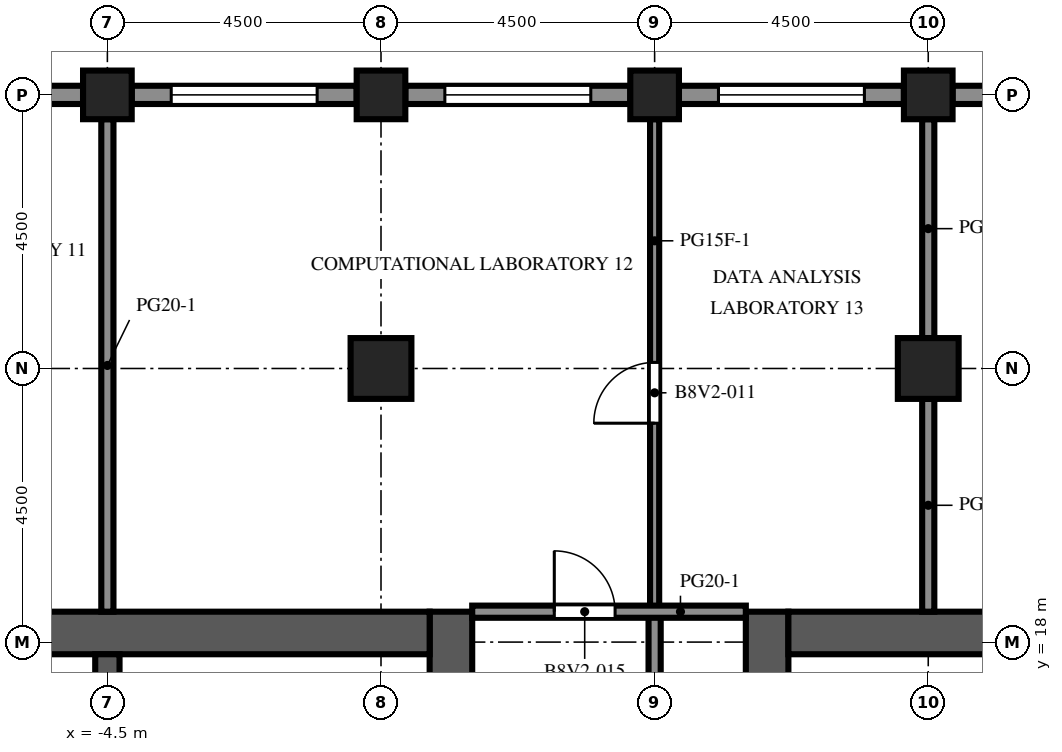
"""IFC4 building model, lengths in metres.
Left out: names, types, materials, properties, quantities, classifications, styles, units other than length and angle.
Written with IfcOpenShell. Run it as: python <this file> out.ifc"""

import sys

from ifc_helpers import new_model, si_unit, direction, frame, frame_2d, origin, origin_2d, place, context, subcontext, project, spatial, rectangle, extrude, element, fill, save


model = new_model("IFC4")
c1 = context("Model", 3, precision=1e-05, world=origin(), true_north=direction((0.0, 1.0)))
c2 = subcontext(c1, "Body", "Model", "MODEL_VIEW")
j1 = project(units=[si_unit("LENGTHUNIT", "METRE"), si_unit("PLANEANGLEUNIT", "RADIAN")], contexts=[c1])
p1 = place(None, origin())
s1 = spatial("IfcSite", under=j1, at=p1, CompositionType="ELEMENT")
p2 = place(p1, origin())
s2 = spatial("IfcBuilding", under=s1, at=p2, CompositionType="ELEMENT")
p3 = place(p2, frame((0.0, 0.0, 282.7)))
s3 = spatial("IfcBuildingStorey", under=s2, at=p3, CompositionType="ELEMENT", Elevation=282.7)
for number, where, z_axis, x_axis in (
    (1, (-4.5, 27.0, 0.0), (0.0, 0.0, 1.0), (1.0, 0.0, 0.0)),
    (2, (0.0, 27.0, 0.0), (0.0, 0.0, 1.0), (1.0, 0.0, 0.0)),
    (3, (4.5, 27.0, 0.0), (0.0, 0.0, 1.0), (1.0, 0.0, 0.0)),
    (4, (9.0, 27.0, 0.0), (0.0, 0.0, 1.0), (1.0, 0.0, 0.0)),
):
    element("IfcColumn", number, at=place(p3, frame(where, z_axis=z_axis, x_axis=x_axis)), inside=s3, PredefinedType="COLUMN", context=c2, shape_type="SweptSolid", body=[
        extrude(rectangle(XDim=0.8, YDim=0.8, at=origin_2d()), origin(), (0.0, 0.0, 1.0), 4.1),
    ])
for number, where, z_axis, x_axis in (
    (5, (0.0, 22.5, 0.0), (0.0, 0.0, 1.0), (1.0, 0.0, 0.0)),
    (6, (9.0, 22.5, 0.0), (0.0, 0.0, 1.0), (1.0, 0.0, 0.0)),
):
    element("IfcColumn", number, at=place(p3, frame(where, z_axis=z_axis, x_axis=x_axis)), inside=s3, PredefinedType="COLUMN", context=c2, shape_type="SweptSolid", body=[
        extrude(rectangle(XDim=1.0, YDim=1.0, at=origin_2d()), origin(), (0.0, 0.0, 1.0), 4.1),
    ])
p4 = place(p3, frame((1.15, -9.0, 0.0), z_axis=(0.0, 0.0, 1.0), x_axis=(0.0, 1.0, 0.0)))
e7 = element("IfcWall", 7, at=p4, inside=s3, PredefinedType="SHEAR", context=c2, shape_type="SweptSolid", body=[
    extrude(rectangle(XDim=27.5, YDim=0.7, at=frame_2d((13.75, 0.0))), origin(), (0.0, 0.0, 1.0), 4.1),
])
p5 = place(p4, frame((12.55, 0.0, 0.0)))
e8 = element("IfcOpeningElement", 8, at=p5, cuts=e7, PredefinedType="OPENING", context=c2, shape_type="SweptSolid", body=[
    extrude(rectangle(XDim=2.4, YDim=2.4, at=frame_2d((1.2, 1.2))), frame((0.0, 0.36, 0.0), z_axis=(0.0, -1.0, 0.0), x_axis=(1.0, 0.0, 0.0)), (0.0, 0.0, 1.0), 0.72),
])
p6 = place(p4, frame((3.9, 0.0, 0.0)))
e9 = element("IfcOpeningElement", 9, at=p6, cuts=e7, PredefinedType="OPENING", context=c2, shape_type="SweptSolid", body=[
    extrude(rectangle(XDim=1.2, YDim=2.1, at=frame_2d((0.6, 1.05))), frame((0.0, 0.36, 0.0), z_axis=(0.0, -1.0, 0.0), x_axis=(1.0, 0.0, 0.0)), (0.0, 0.0, 1.0), 0.72),
])
p7 = place(p4, frame((22.4, 0.0, 0.0)))
e10 = element("IfcOpeningElement", 10, at=p7, cuts=e7, PredefinedType="OPENING", context=c2, shape_type="SweptSolid", body=[
    extrude(rectangle(XDim=1.2, YDim=2.1, at=frame_2d((0.6, 1.05))), frame((0.0, 0.36, 0.0), z_axis=(0.0, -1.0, 0.0), x_axis=(1.0, 0.0, 0.0)), (0.0, 0.0, 1.0), 0.72),
])
p8 = place(p3, frame((-9.8, 18.15, 0.0), z_axis=(0.0, 0.0, 1.0), x_axis=(1.0, 0.0, 0.0)))
e11 = element("IfcWall", 11, at=p8, inside=s3, PredefinedType="SHEAR", context=c2, shape_type="SweptSolid", body=[
    extrude(rectangle(XDim=10.6, YDim=0.7, at=frame_2d((5.3, 0.0))), origin(), (0.0, 0.0, 1.0), 4.1),
])
p9 = place(p3, frame((-4.5, 10.2, 0.0), z_axis=(0.0, 0.0, 1.0), x_axis=(0.0, 1.0, 0.0)))
e12 = element("IfcWall", 12, at=p9, inside=s3, PredefinedType="SHEAR", context=c2, shape_type="SweptSolid", body=[
    extrude(rectangle(XDim=7.6, YDim=0.4, at=frame_2d((3.8, 0.0))), origin(), (0.0, 0.0, 1.0), 4.1),
])
p10 = place(p3, frame((6.35, -9.0, 0.0), z_axis=(0.0, 0.0, 1.0), x_axis=(0.0, 1.0, 0.0)))
e13 = element("IfcWall", 13, at=p10, inside=s3, PredefinedType="SHEAR", context=c2, shape_type="SweptSolid", body=[
    extrude(rectangle(XDim=27.5, YDim=0.7, at=frame_2d((13.75, 0.0))), origin(), (0.0, 0.0, 1.0), 4.1),
])
p11 = place(p10, frame((12.55, 0.0, 0.0)))
e14 = element("IfcOpeningElement", 14, at=p11, cuts=e13, PredefinedType="OPENING", context=c2, shape_type="SweptSolid", body=[
    extrude(rectangle(XDim=2.4, YDim=2.4, at=frame_2d((1.2, 1.2))), frame((0.0, 0.36, 0.0), z_axis=(0.0, -1.0, 0.0), x_axis=(1.0, 0.0, 0.0)), (0.0, 0.0, 1.0), 0.72),
])
p12 = place(p10, frame((3.9, 0.0, 0.0)))
e15 = element("IfcOpeningElement", 15, at=p12, cuts=e13, PredefinedType="OPENING", context=c2, shape_type="SweptSolid", body=[
    extrude(rectangle(XDim=1.2, YDim=2.1, at=frame_2d((0.6, 1.05))), frame((0.0, 0.36, 0.0), z_axis=(0.0, -1.0, 0.0), x_axis=(1.0, 0.0, 0.0)), (0.0, 0.0, 1.0), 0.72),
])
p13 = place(p10, frame((22.4, 0.0, 0.0)))
e16 = element("IfcOpeningElement", 16, at=p13, cuts=e13, PredefinedType="OPENING", context=c2, shape_type="SweptSolid", body=[
    extrude(rectangle(XDim=1.2, YDim=2.1, at=frame_2d((0.6, 1.05))), frame((0.0, 0.36, 0.0), z_axis=(0.0, -1.0, 0.0), x_axis=(1.0, 0.0, 0.0)), (0.0, 0.0, 1.0), 0.72),
])
p14 = place(p3, frame((6.7, 18.15, 0.0), z_axis=(0.0, 0.0, 1.0), x_axis=(1.0, 0.0, 0.0)))
e17 = element("IfcWall", 17, at=p14, inside=s3, PredefinedType="SHEAR", context=c2, shape_type="SweptSolid", body=[
    extrude(rectangle(XDim=10.6, YDim=0.7, at=frame_2d((5.3, 0.0))), origin(), (0.0, 0.0, 1.0), 4.1),
])
p15 = place(p3, frame((9.4, 27.0, 0.0), z_axis=(0.0, 0.0, 1.0), x_axis=(1.0, 0.0, 0.0)))
e18 = element("IfcWall", 18, at=p15, inside=s3, PredefinedType="SOLIDWALL", context=c2, shape_type="SweptSolid", body=[
    extrude(rectangle(XDim=3.7, YDim=0.3, at=frame_2d((1.85, 0.0))), origin(), (0.0, 0.0, 1.0), 2.85),
])
p16 = place(p15, frame((1.35, 0.0, 0.0)))
e19 = element("IfcOpeningElement", 19, at=p16, cuts=e18, PredefinedType="OPENING", context=c2, shape_type="SweptSolid", body=[
    extrude(rectangle(XDim=1.0, YDim=2.2, at=frame_2d((0.5, 1.1))), frame((0.0, 0.16, 0.0), z_axis=(0.0, -1.0, 0.0), x_axis=(1.0, 0.0, 0.0)), (0.0, 0.0, 1.0), 0.32),
])
p17 = place(p3, frame((4.9, 27.0, 0.0), z_axis=(0.0, 0.0, 1.0), x_axis=(1.0, 0.0, 0.0)))
e20 = element("IfcWall", 20, at=p17, inside=s3, PredefinedType="SOLIDWALL", context=c2, shape_type="SweptSolid", body=[
    extrude(rectangle(XDim=3.7, YDim=0.3, at=frame_2d((1.85, 0.0))), origin(), (0.0, 0.0, 1.0), 2.85),
])
p18 = place(p17, frame((0.65, 0.0, 0.8)))
e21 = element("IfcOpeningElement", 21, at=p18, cuts=e20, PredefinedType="OPENING", context=c2, shape_type="SweptSolid", body=[
    extrude(rectangle(XDim=2.4, YDim=1.7, at=frame_2d((1.2, 0.85))), frame((0.0, 0.16, 0.0), z_axis=(0.0, -1.0, 0.0), x_axis=(1.0, 0.0, 0.0)), (0.0, 0.0, 1.0), 0.32),
])
p19 = place(p3, frame((0.4, 27.0, 0.0), z_axis=(0.0, 0.0, 1.0), x_axis=(1.0, 0.0, 0.0)))
e22 = element("IfcWall", 22, at=p19, inside=s3, PredefinedType="SOLIDWALL", context=c2, shape_type="SweptSolid", body=[
    extrude(rectangle(XDim=3.7, YDim=0.3, at=frame_2d((1.85, 0.0))), origin(), (0.0, 0.0, 1.0), 2.85),
])
p20 = place(p19, frame((0.65, 0.0, 0.8)))
e23 = element("IfcOpeningElement", 23, at=p20, cuts=e22, PredefinedType="OPENING", context=c2, shape_type="SweptSolid", body=[
    extrude(rectangle(XDim=2.4, YDim=1.7, at=frame_2d((1.2, 0.85))), frame((0.0, 0.16, 0.0), z_axis=(0.0, -1.0, 0.0), x_axis=(1.0, 0.0, 0.0)), (0.0, 0.0, 1.0), 0.32),
])
p21 = place(p3, frame((-4.1, 27.0, 0.0), z_axis=(0.0, 0.0, 1.0), x_axis=(1.0, 0.0, 0.0)))
e24 = element("IfcWall", 24, at=p21, inside=s3, PredefinedType="SOLIDWALL", context=c2, shape_type="SweptSolid", body=[
    extrude(rectangle(XDim=3.7, YDim=0.3, at=frame_2d((1.85, 0.0))), origin(), (0.0, 0.0, 1.0), 2.85),
])
p22 = place(p21, frame((0.65, 0.0, 0.8)))
e25 = element("IfcOpeningElement", 25, at=p22, cuts=e24, PredefinedType="OPENING", context=c2, shape_type="SweptSolid", body=[
    extrude(rectangle(XDim=2.4, YDim=1.7, at=frame_2d((1.2, 0.85))), frame((0.0, 0.16, 0.0), z_axis=(0.0, -1.0, 0.0), x_axis=(1.0, 0.0, 0.0)), (0.0, 0.0, 1.0), 0.32),
])
p23 = place(p3, frame((-8.6, 27.0, 0.0), z_axis=(0.0, 0.0, 1.0), x_axis=(1.0, 0.0, 0.0)))
e26 = element("IfcWall", 26, at=p23, inside=s3, PredefinedType="SOLIDWALL", context=c2, shape_type="SweptSolid", body=[
    extrude(rectangle(XDim=3.7, YDim=0.3, at=frame_2d((1.85, 0.0))), origin(), (0.0, 0.0, 1.0), 2.85),
])
p24 = place(p23, frame((0.65, 0.0, 0.8)))
e27 = element("IfcOpeningElement", 27, at=p24, cuts=e26, PredefinedType="OPENING", context=c2, shape_type="SweptSolid", body=[
    extrude(rectangle(XDim=2.4, YDim=1.7, at=frame_2d((1.2, 0.85))), frame((0.0, 0.16, 0.0), z_axis=(0.0, -1.0, 0.0), x_axis=(1.0, 0.0, 0.0)), (0.0, 0.0, 1.0), 0.32),
])
p25 = place(p3, frame((-0.6, 14.912, 0.0), z_axis=(0.0, 0.0, 1.0), x_axis=(0.0, 1.0, 0.0)))
e28 = element("IfcWall", 28, at=p25, inside=s3, PredefinedType="PARTITIONING", context=c2, shape_type="SweptSolid", body=[
    extrude(rectangle(XDim=2.888, YDim=0.1, at=frame_2d((1.444, 0.0))), origin(), (0.0, 0.0, 1.0), 3.65),
])
p26 = place(p25, frame((0.944, 0.0, 0.0)))
e29 = element("IfcOpeningElement", 29, at=p26, cuts=e28, PredefinedType="OPENING", context=c2, shape_type="SweptSolid", body=[
    extrude(rectangle(XDim=1.0, YDim=2.1, at=frame_2d((0.5, 1.05))), frame((0.0, 0.06, 0.0), z_axis=(0.0, -1.0, 0.0), x_axis=(1.0, 0.0, 0.0)), (0.0, 0.0, 1.0), 0.12),
])
p27 = place(p3, frame((8.1, 14.912, 0.0), z_axis=(0.0, 0.0, 1.0), x_axis=(0.0, 1.0, 0.0)))
e30 = element("IfcWall", 30, at=p27, inside=s3, PredefinedType="PARTITIONING", context=c2, shape_type="SweptSolid", body=[
    extrude(rectangle(XDim=2.888, YDim=0.1, at=frame_2d((1.444, 0.0))), origin(), (0.0, 0.0, 1.0), 3.65),
])
p28 = place(p27, frame((0.944, 0.0, 0.0)))
e31 = element("IfcOpeningElement", 31, at=p28, cuts=e30, PredefinedType="OPENING", context=c2, shape_type="SweptSolid", body=[
    extrude(rectangle(XDim=1.0, YDim=2.1, at=frame_2d((0.5, 1.05))), frame((0.0, 0.06, 0.0), z_axis=(0.0, -1.0, 0.0), x_axis=(1.0, 0.0, 0.0)), (0.0, 0.0, 1.0), 0.12),
])
p29 = place(p3, frame((-4.5, 18.5, 0.0), z_axis=(0.0, 0.0, 1.0), x_axis=(0.0, 1.0, 0.0)))
e32 = element("IfcWall", 32, at=p29, inside=s3, PredefinedType="PARTITIONING", context=c2, shape_type="SweptSolid", body=[
    extrude(rectangle(XDim=8.1, YDim=0.2, at=frame_2d((4.05, 0.0))), origin(), (0.0, 0.0, 1.0), 3.65),
])
p30 = place(p3, frame((4.5, 26.6, 0.0), z_axis=(0.0, 0.0, 1.0), x_axis=(0.0, -1.0, 0.0)))
e33 = element("IfcWall", 33, at=p30, inside=s3, PredefinedType="PARTITIONING", context=c2, shape_type="SweptSolid", body=[
    extrude(rectangle(XDim=8.1, YDim=0.15, at=frame_2d((4.05, 0.0))), origin(), (0.0, 0.0, 1.0), 3.65),
])
p31 = place(p30, frame((4.0, 0.0, 0.0)))
e34 = element("IfcOpeningElement", 34, at=p31, cuts=e33, PredefinedType="OPENING", context=c2, shape_type="SweptSolid", body=[
    extrude(rectangle(XDim=1.0, YDim=2.1, at=frame_2d((0.5, 1.05))), frame((0.0, 0.085, 0.0), z_axis=(0.0, -1.0, 0.0), x_axis=(1.0, 0.0, 0.0)), (0.0, 0.0, 1.0), 0.17),
])
p32 = place(p3, frame((4.5, 18.5, 0.0), z_axis=(0.0, 0.0, 1.0), x_axis=(0.0, -1.0, 0.0)))
e35 = element("IfcWall", 35, at=p32, inside=s3, PredefinedType="PARTITIONING", context=c2, shape_type="SweptSolid", body=[
    extrude(rectangle(XDim=11.8, YDim=0.2, at=frame_2d((5.9, 0.0))), origin(), (0.0, 0.0, 1.0), 3.65),
])
p33 = place(p32, frame((5.2, 0.0, 0.0)))
e36 = element("IfcOpeningElement", 36, at=p33, cuts=e35, PredefinedType="OPENING", context=c2, shape_type="SweptSolid", body=[
    extrude(rectangle(XDim=1.0, YDim=2.1, at=frame_2d((0.5, 1.05))), frame((0.0, 0.11, 0.0), z_axis=(0.0, -1.0, 0.0), x_axis=(1.0, 0.0, 0.0)), (0.0, 0.0, 1.0), 0.22),
])
p34 = place(p3, frame((9.0, 18.5, 0.0), z_axis=(0.0, 0.0, 1.0), x_axis=(0.0, 1.0, 0.0)))
e37 = element("IfcWall", 37, at=p34, inside=s3, PredefinedType="PARTITIONING", context=c2, shape_type="SweptSolid", body=[
    extrude(rectangle(XDim=3.5, YDim=0.2, at=frame_2d((1.75, 0.0))), origin(), (0.0, 0.0, 1.0), 3.65),
])
p35 = place(p3, frame((9.0, 23.0, 0.0), z_axis=(0.0, 0.0, 1.0), x_axis=(0.0, 1.0, 0.0)))
e38 = element("IfcWall", 38, at=p35, inside=s3, PredefinedType="PARTITIONING", context=c2, shape_type="SweptSolid", body=[
    extrude(rectangle(XDim=3.6, YDim=0.2, at=frame_2d((1.8, 0.0))), origin(), (0.0, 0.0, 1.0), 3.65),
])
p36 = place(p3, frame((1.5, 18.5, 0.0), z_axis=(0.0, 0.0, 1.0), x_axis=(1.0, 0.0, 0.0)))
e39 = element("IfcWall", 39, at=p36, inside=s3, PredefinedType="PARTITIONING", context=c2, shape_type="SweptSolid", body=[
    extrude(rectangle(XDim=4.5, YDim=0.2, at=frame_2d((2.25, 0.0))), origin(), (0.0, 0.0, 1.0), 3.65),
])
p37 = place(p36, frame((1.35, 0.0, 0.0)))
e40 = element("IfcOpeningElement", 40, at=p37, cuts=e39, PredefinedType="OPENING", context=c2, shape_type="SweptSolid", body=[
    extrude(rectangle(XDim=1.0, YDim=2.1, at=frame_2d((0.5, 1.05))), frame((0.0, 0.11, 0.0), z_axis=(0.0, -1.0, 0.0), x_axis=(1.0, 0.0, 0.0)), (0.0, 0.0, 1.0), 0.22),
])
p38 = place(p18, origin())
e41 = element("IfcWindow", 41, at=p38, inside=s3, PartitioningType="SINGLE_PANEL", PredefinedType="WINDOW", context=c2, shape_type="SweptSolid", body=[
    extrude(rectangle(XDim=2.4, YDim=1.7, at=frame_2d((1.2, 0.85))), frame((0.0, 0.03, 0.0), z_axis=(0.0, -1.0, 0.0), x_axis=(1.0, 0.0, 0.0)), (0.0, 0.0, 1.0), 0.06),
])
fill(e21, e41)
p39 = place(p20, origin())
e42 = element("IfcWindow", 42, at=p39, inside=s3, PartitioningType="SINGLE_PANEL", PredefinedType="WINDOW", context=c2, shape_type="SweptSolid", body=[
    extrude(rectangle(XDim=2.4, YDim=1.7, at=frame_2d((1.2, 0.85))), frame((0.0, 0.03, 0.0), z_axis=(0.0, -1.0, 0.0), x_axis=(1.0, 0.0, 0.0)), (0.0, 0.0, 1.0), 0.06),
])
fill(e23, e42)
p40 = place(p22, origin())
e43 = element("IfcWindow", 43, at=p40, inside=s3, PartitioningType="SINGLE_PANEL", PredefinedType="WINDOW", context=c2, shape_type="SweptSolid", body=[
    extrude(rectangle(XDim=2.4, YDim=1.7, at=frame_2d((1.2, 0.85))), frame((0.0, 0.03, 0.0), z_axis=(0.0, -1.0, 0.0), x_axis=(1.0, 0.0, 0.0)), (0.0, 0.0, 1.0), 0.06),
])
fill(e25, e43)
p41 = place(p31, origin())
e44 = element("IfcDoor", 44, at=p41, inside=s3, OperationType="SINGLE_SWING_RIGHT", PredefinedType="DOOR", context=c2, shape_type="SweptSolid", body=[
    extrude(rectangle(XDim=1.0, YDim=2.1, at=frame_2d((0.5, 1.05))), frame((0.0, 0.025, 0.0), z_axis=(0.0, -1.0, 0.0), x_axis=(1.0, 0.0, 0.0)), (0.0, 0.0, 1.0), 0.05),
])
fill(e34, e44)
p42 = place(p37, origin())
e45 = element("IfcDoor", 45, at=p42, inside=s3, OperationType="SINGLE_SWING_LEFT", PredefinedType="DOOR", context=c2, shape_type="SweptSolid", body=[
    extrude(rectangle(XDim=1.0, YDim=2.1, at=frame_2d((0.5, 1.05))), frame((0.0, 0.025, 0.0), z_axis=(0.0, -1.0, 0.0), x_axis=(1.0, 0.0, 0.0)), (0.0, 0.0, 1.0), 0.05),
])
fill(e40, e45)
save(model, sys.argv[1])
